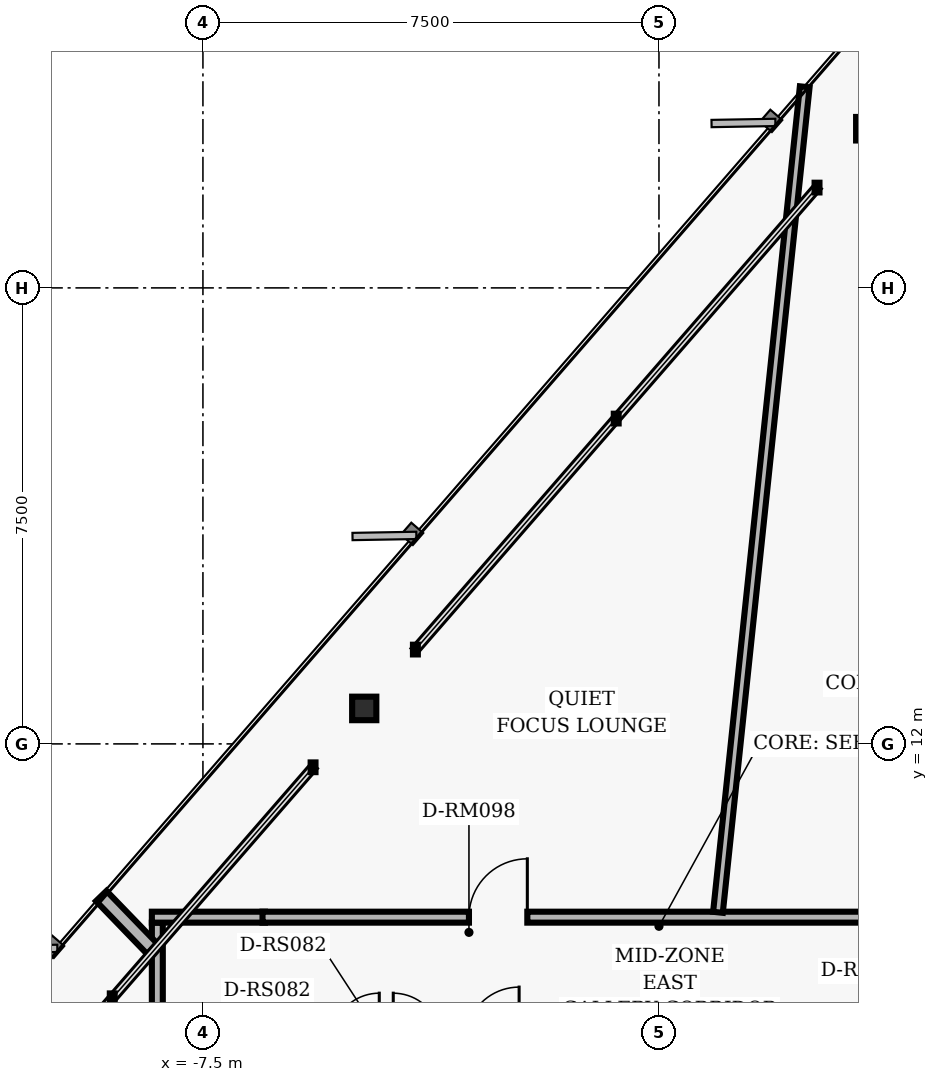
"""IFC4 building model, lengths in metres.
Left out: names, types, materials, properties, quantities, classifications, styles, units other than length and angle.
Written with IfcOpenShell. Run it as: python <this file> out.ifc"""

import sys

from ifc_helpers import new_model, si_unit, direction, frame, frame_2d, origin, origin_2d, place, context, subcontext, project, spatial, rectangle, i_section, extrude, element, fill, save


model = new_model("IFC4")
c1 = context("Model", 3, precision=1e-05, world=origin(), true_north=direction((0.0, 1.0)))
c2 = subcontext(c1, "Body", "Model", "MODEL_VIEW")
j1 = project(units=[si_unit("LENGTHUNIT", "METRE"), si_unit("PLANEANGLEUNIT", "RADIAN")], contexts=[c1])
p1 = place(None, origin())
s1 = spatial("IfcSite", under=j1, at=p1, CompositionType="ELEMENT")
p2 = place(p1, origin())
s2 = spatial("IfcBuilding", under=s1, at=p2, CompositionType="ELEMENT")
p3 = place(p2, frame((0.0, 0.0, 162.4)))
s3 = spatial("IfcBuildingStorey", under=s2, at=p3, CompositionType="ELEMENT", Elevation=162.4)
for number, where, z_axis, x_axis in (
    (1, (3.441, 22.118, 0.0), (0.0, 0.0, 1.0), (1.0, 0.0, 0.0)),
    (2, (-4.847, 12.583, 0.0), (0.0, 0.0, 1.0), (1.0, 0.0, 0.0)),
):
    element("IfcColumn", number, at=place(p3, frame(where, z_axis=z_axis, x_axis=x_axis)), inside=s3, PredefinedType="COLUMN", context=c2, shape_type="SweptSolid", body=[
        extrude(i_section(OverallWidth=0.398, OverallDepth=0.387, WebThickness=0.021, FlangeThickness=0.033, FilletRadius=0.018, at=origin_2d()), origin(), (0.0, 0.0, 1.0), 3.04),
    ])
p4 = place(p3, frame((-8.25, 7.18, 0.0), z_axis=(0.0, 0.0, 1.0), x_axis=(0.0, 1.0, 0.0)))
e3 = element("IfcWall", 3, at=p4, inside=s3, PredefinedType="PARTITIONING", context=c2, shape_type="SweptSolid", body=[
    extrude(rectangle(XDim=1.88, YDim=0.18, at=frame_2d((0.94, 0.0))), origin(), (0.0, 0.0, 1.0), 2.763),
])
p5 = place(p3, frame((-8.34, 9.15, 0.0), z_axis=(0.0, 0.0, 1.0), x_axis=(1.0, 0.0, 0.0)))
e4 = element("IfcWall", 4, at=p5, inside=s3, PredefinedType="PARTITIONING", context=c2, shape_type="SweptSolid", body=[
    extrude(rectangle(XDim=1.86, YDim=0.18, at=frame_2d((0.93, 0.0))), origin(), (0.0, 0.0, 1.0), 2.763),
])
p6 = place(p3, frame((-6.52, 9.15, 0.0), z_axis=(0.0, 0.0, 1.0), x_axis=(1.0, 0.0, 0.0)))
e5 = element("IfcWall", 5, at=p6, inside=s3, PredefinedType="PARTITIONING", context=c2, shape_type="SweptSolid", body=[
    extrude(rectangle(XDim=16.662, YDim=0.18, at=frame_2d((8.331, 0.0))), origin(), (0.0, 0.0, 1.0), 2.763),
])
p7 = place(p6, frame((11.466, 0.0, 0.0)))
e6 = element("IfcOpeningElement", 6, at=p7, cuts=e5, PredefinedType="OPENING", context=c2, shape_type="SweptSolid", body=[
    extrude(rectangle(XDim=0.96, YDim=2.02, at=frame_2d((0.48, 1.01))), frame((0.0, 0.1, 0.0), z_axis=(0.0, -1.0, 0.0), x_axis=(1.0, 0.0, 0.0)), (0.0, 0.0, 1.0), 0.2),
])
p8 = place(p6, frame((3.395, 0.0, 0.0)))
e7 = element("IfcOpeningElement", 7, at=p8, cuts=e5, PredefinedType="OPENING", context=c2, shape_type="SweptSolid", body=[
    extrude(rectangle(XDim=0.96, YDim=2.02, at=frame_2d((0.48, 1.01))), frame((0.0, 0.1, 0.0), z_axis=(0.0, -1.0, 0.0), x_axis=(1.0, 0.0, 0.0)), (0.0, 0.0, 1.0), 0.2),
])
p9 = place(p3, frame((0.97, 9.23, 0.0), z_axis=(0.0, 0.0, 1.0), x_axis=(0.10452931889, 0.994521805438, 0.0)))
e8 = element("IfcWall", 8, at=p9, inside=s3, PredefinedType="PARTITIONING", context=c2, shape_type="SweptSolid", body=[
    extrude(rectangle(XDim=13.652, YDim=0.16, at=frame_2d((6.826, 0.0))), origin(), (0.0, 0.0, 1.0), 2.763),
])
p10 = place(p3, frame((-8.33, 8.626, 0.0), z_axis=(0.0, 0.0, 1.0), x_axis=(-0.694612484143, 0.719384109411, 0.0)))
e9 = element("IfcWall", 9, at=p10, inside=s3, PredefinedType="PARTITIONING", context=c2, shape_type="SweptSolid", body=[
    extrude(rectangle(XDim=1.212, YDim=0.24, at=frame_2d((0.606, 0.0))), origin(), (0.0, 0.0, 1.0), 2.763),
])
p11 = place(p8, origin())
e10 = element("IfcDoor", 10, at=p11, inside=s3, OperationType="SINGLE_SWING_RIGHT", PredefinedType="DOOR", context=c2, shape_type="SweptSolid", body=[
    extrude(rectangle(XDim=0.96, YDim=2.02, at=frame_2d((0.48, 1.01))), frame((0.0, 0.025, 0.0), z_axis=(0.0, -1.0, 0.0), x_axis=(1.0, 0.0, 0.0)), (0.0, 0.0, 1.0), 0.05),
])
fill(e7, e10)
save(model, sys.argv[1])
